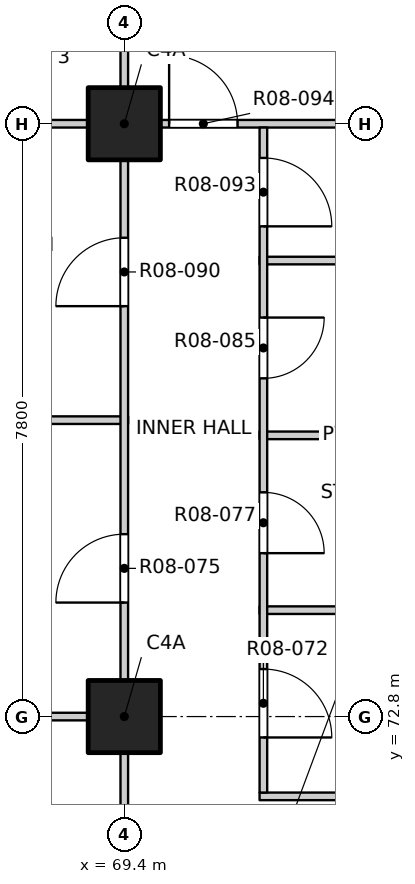
"""IFC4 building model, lengths in metres.
Left out: names, types, materials, properties, quantities, classifications, styles, units other than length and angle.
Written with IfcOpenShell. Run it as: python <this file> out.ifc"""

import sys

from ifc_helpers import new_model, si_unit, direction, frame, frame_2d, origin, origin_2d, place, context, subcontext, project, spatial, rectangle, extrude, element, fill, save


model = new_model("IFC4")
c1 = context("Model", 3, precision=1e-05, world=origin(), true_north=direction((0.0, 1.0)))
c2 = subcontext(c1, "Body", "Model", "MODEL_VIEW")
j1 = project(units=[si_unit("LENGTHUNIT", "METRE"), si_unit("PLANEANGLEUNIT", "RADIAN")], contexts=[c1])
p1 = place(None, origin())
s1 = spatial("IfcSite", under=j1, at=p1, CompositionType="ELEMENT")
p2 = place(p1, origin())
s2 = spatial("IfcBuilding", under=s1, at=p2, CompositionType="ELEMENT")
p3 = place(p2, frame((0.0, 0.0, 99.9)))
s3 = spatial("IfcBuildingStorey", under=s2, at=p3, CompositionType="ELEMENT", Elevation=99.9)
for number, where, z_axis, x_axis in (
    (1, (69.4, 72.8, -0.3), (0.0, 0.0, 1.0), (1.0, 0.0, 0.0)),
    (2, (69.4, 80.6, -0.3), (0.0, 0.0, 1.0), (1.0, 0.0, 0.0)),
):
    element("IfcColumn", number, at=place(p3, frame(where, z_axis=z_axis, x_axis=x_axis)), inside=s3, PredefinedType="COLUMN", context=c2, shape_type="SweptSolid", body=[
        extrude(rectangle(XDim=0.95, YDim=0.95, at=origin_2d()), origin(), (0.0, 0.0, 1.0), 3.45),
    ])
p4 = place(p3, frame((71.18, 71.75, 0.0), z_axis=(0.0, 0.0, 1.0), x_axis=(1.0, 0.0, 0.0)))
e3 = element("IfcWall", 3, at=p4, inside=s3, PredefinedType="PARTITIONING", context=c2, shape_type="SweptSolid", body=[
    extrude(rectangle(XDim=2.22, YDim=0.1, at=frame_2d((1.11, 0.0))), origin(), (0.0, 0.0, 1.0), 3.15),
])
p5 = place(p3, frame((65.8, 72.8, 0.0), z_axis=(0.0, 0.0, 1.0), x_axis=(1.0, 0.0, 0.0)))
e4 = element("IfcWall", 4, at=p5, inside=s3, PredefinedType="PARTITIONING", context=c2, shape_type="SweptSolid", body=[
    extrude(rectangle(XDim=3.65, YDim=0.1, at=frame_2d((1.825, 0.0))), origin(), (0.0, 0.0, 1.0), 3.15),
])
p6 = place(p3, frame((71.18, 74.2, 0.0), z_axis=(0.0, 0.0, 1.0), x_axis=(1.0, 0.0, 0.0)))
e5 = element("IfcWall", 5, at=p6, inside=s3, PredefinedType="PARTITIONING", context=c2, shape_type="SweptSolid", body=[
    extrude(rectangle(XDim=2.22, YDim=0.1, at=frame_2d((1.11, 0.0))), origin(), (0.0, 0.0, 1.0), 3.15),
])
p7 = place(p3, frame((71.18, 76.5, 0.0), z_axis=(0.0, 0.0, 1.0), x_axis=(1.0, 0.0, 0.0)))
e6 = element("IfcWall", 6, at=p7, inside=s3, PredefinedType="PARTITIONING", context=c2, shape_type="SweptSolid", body=[
    extrude(rectangle(XDim=2.22, YDim=0.1, at=frame_2d((1.11, 0.0))), origin(), (0.0, 0.0, 1.0), 2.55),
])
p8 = place(p3, frame((65.8, 76.7, 0.0), z_axis=(0.0, 0.0, 1.0), x_axis=(1.0, 0.0, 0.0)))
e7 = element("IfcWall", 7, at=p8, inside=s3, PredefinedType="PARTITIONING", context=c2, shape_type="SweptSolid", body=[
    extrude(rectangle(XDim=3.65, YDim=0.1, at=frame_2d((1.825, 0.0))), origin(), (0.0, 0.0, 1.0), 2.55),
])
p9 = place(p3, frame((71.18, 78.8, 0.0), z_axis=(0.0, 0.0, 1.0), x_axis=(1.0, 0.0, 0.0)))
e8 = element("IfcWall", 8, at=p9, inside=s3, PredefinedType="PARTITIONING", context=c2, shape_type="SweptSolid", body=[
    extrude(rectangle(XDim=2.22, YDim=0.1, at=frame_2d((1.11, 0.0))), origin(), (0.0, 0.0, 1.0), 3.15),
])
p10 = place(p3, frame((65.8, 80.6, 0.0), z_axis=(0.0, 0.0, 1.0), x_axis=(1.0, 0.0, 0.0)))
e9 = element("IfcWall", 9, at=p10, inside=s3, PredefinedType="PARTITIONING", context=c2, shape_type="SweptSolid", body=[
    extrude(rectangle(XDim=7.6, YDim=0.1, at=frame_2d((3.8, 0.0))), origin(), (0.0, 0.0, 1.0), 3.15),
])
p11 = place(p10, frame((4.19, 0.0, 0.0)))
e10 = element("IfcOpeningElement", 10, at=p11, cuts=e9, PredefinedType="OPENING", context=c2, shape_type="SweptSolid", body=[
    extrude(rectangle(XDim=0.9, YDim=2.1, at=frame_2d((0.45, 1.05))), frame((0.0, 0.06, 0.0), z_axis=(0.0, -1.0, 0.0), x_axis=(1.0, 0.0, 0.0)), (0.0, 0.0, 1.0), 0.12),
])
p12 = place(p3, frame((69.4, 45.8, 0.0), z_axis=(0.0, 0.0, 1.0), x_axis=(0.0, 1.0, 0.0)))
e11 = element("IfcWall", 11, at=p12, inside=s3, PredefinedType="PARTITIONING", context=c2, shape_type="SweptSolid", body=[
    extrude(rectangle(XDim=38.4, YDim=0.1, at=frame_2d((19.2, 0.0))), origin(), (0.0, 0.0, 1.0), 3.15),
])
p13 = place(p12, frame((1.05, 0.0, 0.0)))
e12 = element("IfcOpeningElement", 12, at=p13, cuts=e11, PredefinedType="OPENING", context=c2, shape_type="SweptSolid", body=[
    extrude(rectangle(XDim=1.2, YDim=2.1, at=frame_2d((0.6, 1.05))), frame((0.0, 0.06, 0.0), z_axis=(0.0, -1.0, 0.0), x_axis=(1.0, 0.0, 0.0)), (0.0, 0.0, 1.0), 0.12),
])
p14 = place(p12, frame((5.1, 0.0, 0.0)))
e13 = element("IfcOpeningElement", 13, at=p14, cuts=e11, PredefinedType="OPENING", context=c2, shape_type="SweptSolid", body=[
    extrude(rectangle(XDim=0.9, YDim=2.1, at=frame_2d((0.45, 1.05))), frame((0.0, 0.06, 0.0), z_axis=(0.0, -1.0, 0.0), x_axis=(1.0, 0.0, 0.0)), (0.0, 0.0, 1.0), 0.12),
])
p15 = place(p12, frame((9.0, 0.0, 0.0)))
e14 = element("IfcOpeningElement", 14, at=p15, cuts=e11, PredefinedType="OPENING", context=c2, shape_type="SweptSolid", body=[
    extrude(rectangle(XDim=0.9, YDim=2.1, at=frame_2d((0.45, 1.05))), frame((0.0, 0.06, 0.0), z_axis=(0.0, -1.0, 0.0), x_axis=(1.0, 0.0, 0.0)), (0.0, 0.0, 1.0), 0.12),
])
p16 = place(p12, frame((12.9, 0.0, 0.0)))
e15 = element("IfcOpeningElement", 15, at=p16, cuts=e11, PredefinedType="OPENING", context=c2, shape_type="SweptSolid", body=[
    extrude(rectangle(XDim=0.9, YDim=2.1, at=frame_2d((0.45, 1.05))), frame((0.0, 0.06, 0.0), z_axis=(0.0, -1.0, 0.0), x_axis=(1.0, 0.0, 0.0)), (0.0, 0.0, 1.0), 0.12),
])
p17 = place(p12, frame((16.8, 0.0, 0.0)))
e16 = element("IfcOpeningElement", 16, at=p17, cuts=e11, PredefinedType="OPENING", context=c2, shape_type="SweptSolid", body=[
    extrude(rectangle(XDim=0.9, YDim=2.1, at=frame_2d((0.45, 1.05))), frame((0.0, 0.06, 0.0), z_axis=(0.0, -1.0, 0.0), x_axis=(1.0, 0.0, 0.0)), (0.0, 0.0, 1.0), 0.12),
])
p18 = place(p12, frame((20.7, 0.0, 0.0)))
e17 = element("IfcOpeningElement", 17, at=p18, cuts=e11, PredefinedType="OPENING", context=c2, shape_type="SweptSolid", body=[
    extrude(rectangle(XDim=0.9, YDim=2.1, at=frame_2d((0.45, 1.05))), frame((0.0, 0.06, 0.0), z_axis=(0.0, -1.0, 0.0), x_axis=(1.0, 0.0, 0.0)), (0.0, 0.0, 1.0), 0.12),
])
p19 = place(p12, frame((24.6, 0.0, 0.0)))
e18 = element("IfcOpeningElement", 18, at=p19, cuts=e11, PredefinedType="OPENING", context=c2, shape_type="SweptSolid", body=[
    extrude(rectangle(XDim=0.9, YDim=2.1, at=frame_2d((0.45, 1.05))), frame((0.0, 0.06, 0.0), z_axis=(0.0, -1.0, 0.0), x_axis=(1.0, 0.0, 0.0)), (0.0, 0.0, 1.0), 0.12),
])
p20 = place(p12, frame((28.5, 0.0, 0.0)))
e19 = element("IfcOpeningElement", 19, at=p20, cuts=e11, PredefinedType="OPENING", context=c2, shape_type="SweptSolid", body=[
    extrude(rectangle(XDim=0.9, YDim=2.1, at=frame_2d((0.45, 1.05))), frame((0.0, 0.06, 0.0), z_axis=(0.0, -1.0, 0.0), x_axis=(1.0, 0.0, 0.0)), (0.0, 0.0, 1.0), 0.12),
])
p21 = place(p12, frame((32.4, 0.0, 0.0)))
e20 = element("IfcOpeningElement", 20, at=p21, cuts=e11, PredefinedType="OPENING", context=c2, shape_type="SweptSolid", body=[
    extrude(rectangle(XDim=0.9, YDim=2.1, at=frame_2d((0.45, 1.05))), frame((0.0, 0.06, 0.0), z_axis=(0.0, -1.0, 0.0), x_axis=(1.0, 0.0, 0.0)), (0.0, 0.0, 1.0), 0.12),
])
p22 = place(p12, frame((36.15, 0.0, 0.0)))
e21 = element("IfcOpeningElement", 21, at=p22, cuts=e11, PredefinedType="OPENING", context=c2, shape_type="SweptSolid", body=[
    extrude(rectangle(XDim=1.2, YDim=2.1, at=frame_2d((0.6, 1.05))), frame((0.0, 0.06, 0.0), z_axis=(0.0, -1.0, 0.0), x_axis=(1.0, 0.0, 0.0)), (0.0, 0.0, 1.0), 0.12),
])
p23 = place(p3, frame((71.23, 71.8, 0.0), z_axis=(0.0, 0.0, 1.0), x_axis=(0.0, 1.0, 0.0)))
e22 = element("IfcWall", 22, at=p23, inside=s3, PredefinedType="PARTITIONING", context=c2, shape_type="SweptSolid", body=[
    extrude(rectangle(XDim=8.75, YDim=0.1, at=frame_2d((4.375, 0.0))), origin(), (0.0, 0.0, 1.0), 3.15),
])
p24 = place(p23, frame((0.725, 0.0, 0.0)))
e23 = element("IfcOpeningElement", 23, at=p24, cuts=e22, PredefinedType="OPENING", context=c2, shape_type="SweptSolid", body=[
    extrude(rectangle(XDim=0.9, YDim=2.1, at=frame_2d((0.45, 1.05))), frame((0.0, 0.06, 0.0), z_axis=(0.0, -1.0, 0.0), x_axis=(1.0, 0.0, 0.0)), (0.0, 0.0, 1.0), 0.12),
])
p25 = place(p23, frame((3.15, 0.0, 0.0)))
e24 = element("IfcOpeningElement", 24, at=p25, cuts=e22, PredefinedType="OPENING", context=c2, shape_type="SweptSolid", body=[
    extrude(rectangle(XDim=0.8, YDim=2.1, at=frame_2d((0.4, 1.05))), frame((0.0, 0.06, 0.0), z_axis=(0.0, -1.0, 0.0), x_axis=(1.0, 0.0, 0.0)), (0.0, 0.0, 1.0), 0.12),
])
p26 = place(p23, frame((5.45, 0.0, 0.0)))
e25 = element("IfcOpeningElement", 25, at=p26, cuts=e22, PredefinedType="OPENING", context=c2, shape_type="SweptSolid", body=[
    extrude(rectangle(XDim=0.8, YDim=2.1, at=frame_2d((0.4, 1.05))), frame((0.0, 0.06, 0.0), z_axis=(0.0, -1.0, 0.0), x_axis=(1.0, 0.0, 0.0)), (0.0, 0.0, 1.0), 0.12),
])
p27 = place(p23, frame((7.45, 0.0, 0.0)))
e26 = element("IfcOpeningElement", 26, at=p27, cuts=e22, PredefinedType="OPENING", context=c2, shape_type="SweptSolid", body=[
    extrude(rectangle(XDim=0.9, YDim=2.1, at=frame_2d((0.45, 1.05))), frame((0.0, 0.06, 0.0), z_axis=(0.0, -1.0, 0.0), x_axis=(1.0, 0.0, 0.0)), (0.0, 0.0, 1.0), 0.12),
])
p28 = place(p24, origin())
e27 = element("IfcDoor", 27, at=p28, inside=s3, OperationType="SINGLE_SWING_RIGHT", PredefinedType="DOOR", context=c2, shape_type="SweptSolid", body=[
    extrude(rectangle(XDim=0.9, YDim=2.1, at=frame_2d((0.45, 1.05))), frame((0.0, 0.025, 0.0), z_axis=(0.0, -1.0, 0.0), x_axis=(1.0, 0.0, 0.0)), (0.0, 0.0, 1.0), 0.05),
])
fill(e23, e27)
p29 = place(p20, origin())
e28 = element("IfcDoor", 28, at=p29, inside=s3, OperationType="SINGLE_SWING_LEFT", PredefinedType="DOOR", context=c2, shape_type="SweptSolid", body=[
    extrude(rectangle(XDim=0.9, YDim=2.1, at=frame_2d((0.45, 1.05))), frame((0.0, 0.025, 0.0), z_axis=(0.0, -1.0, 0.0), x_axis=(1.0, 0.0, 0.0)), (0.0, 0.0, 1.0), 0.05),
])
fill(e19, e28)
p30 = place(p25, origin())
e29 = element("IfcDoor", 29, at=p30, inside=s3, OperationType="SINGLE_SWING_RIGHT", PredefinedType="DOOR", context=c2, shape_type="SweptSolid", body=[
    extrude(rectangle(XDim=0.8, YDim=2.1, at=frame_2d((0.4, 1.05))), frame((0.0, 0.025, 0.0), z_axis=(0.0, -1.0, 0.0), x_axis=(1.0, 0.0, 0.0)), (0.0, 0.0, 1.0), 0.05),
])
fill(e24, e29)
p31 = place(p26, origin())
e30 = element("IfcDoor", 30, at=p31, inside=s3, OperationType="SINGLE_SWING_LEFT", PredefinedType="DOOR", context=c2, shape_type="SweptSolid", body=[
    extrude(rectangle(XDim=0.8, YDim=2.1, at=frame_2d((0.4, 1.05))), frame((0.0, 0.025, 0.0), z_axis=(0.0, -1.0, 0.0), x_axis=(1.0, 0.0, 0.0)), (0.0, 0.0, 1.0), 0.05),
])
fill(e25, e30)
p32 = place(p21, origin())
e31 = element("IfcDoor", 31, at=p32, inside=s3, OperationType="SINGLE_SWING_LEFT", PredefinedType="DOOR", context=c2, shape_type="SweptSolid", body=[
    extrude(rectangle(XDim=0.9, YDim=2.1, at=frame_2d((0.45, 1.05))), frame((0.0, 0.025, 0.0), z_axis=(0.0, -1.0, 0.0), x_axis=(1.0, 0.0, 0.0)), (0.0, 0.0, 1.0), 0.05),
])
fill(e20, e31)
p33 = place(p27, origin())
e32 = element("IfcDoor", 32, at=p33, inside=s3, OperationType="SINGLE_SWING_RIGHT", PredefinedType="DOOR", context=c2, shape_type="SweptSolid", body=[
    extrude(rectangle(XDim=0.9, YDim=2.1, at=frame_2d((0.45, 1.05))), frame((0.0, 0.025, 0.0), z_axis=(0.0, -1.0, 0.0), x_axis=(1.0, 0.0, 0.0)), (0.0, 0.0, 1.0), 0.05),
])
fill(e26, e32)
p34 = place(p11, origin())
e33 = element("IfcDoor", 33, at=p34, inside=s3, OperationType="SINGLE_SWING_LEFT", PredefinedType="DOOR", context=c2, shape_type="SweptSolid", body=[
    extrude(rectangle(XDim=0.9, YDim=2.1, at=frame_2d((0.45, 1.05))), frame((0.0, 0.025, 0.0), z_axis=(0.0, -1.0, 0.0), x_axis=(1.0, 0.0, 0.0)), (0.0, 0.0, 1.0), 0.05),
])
fill(e10, e33)
save(model, sys.argv[1])
